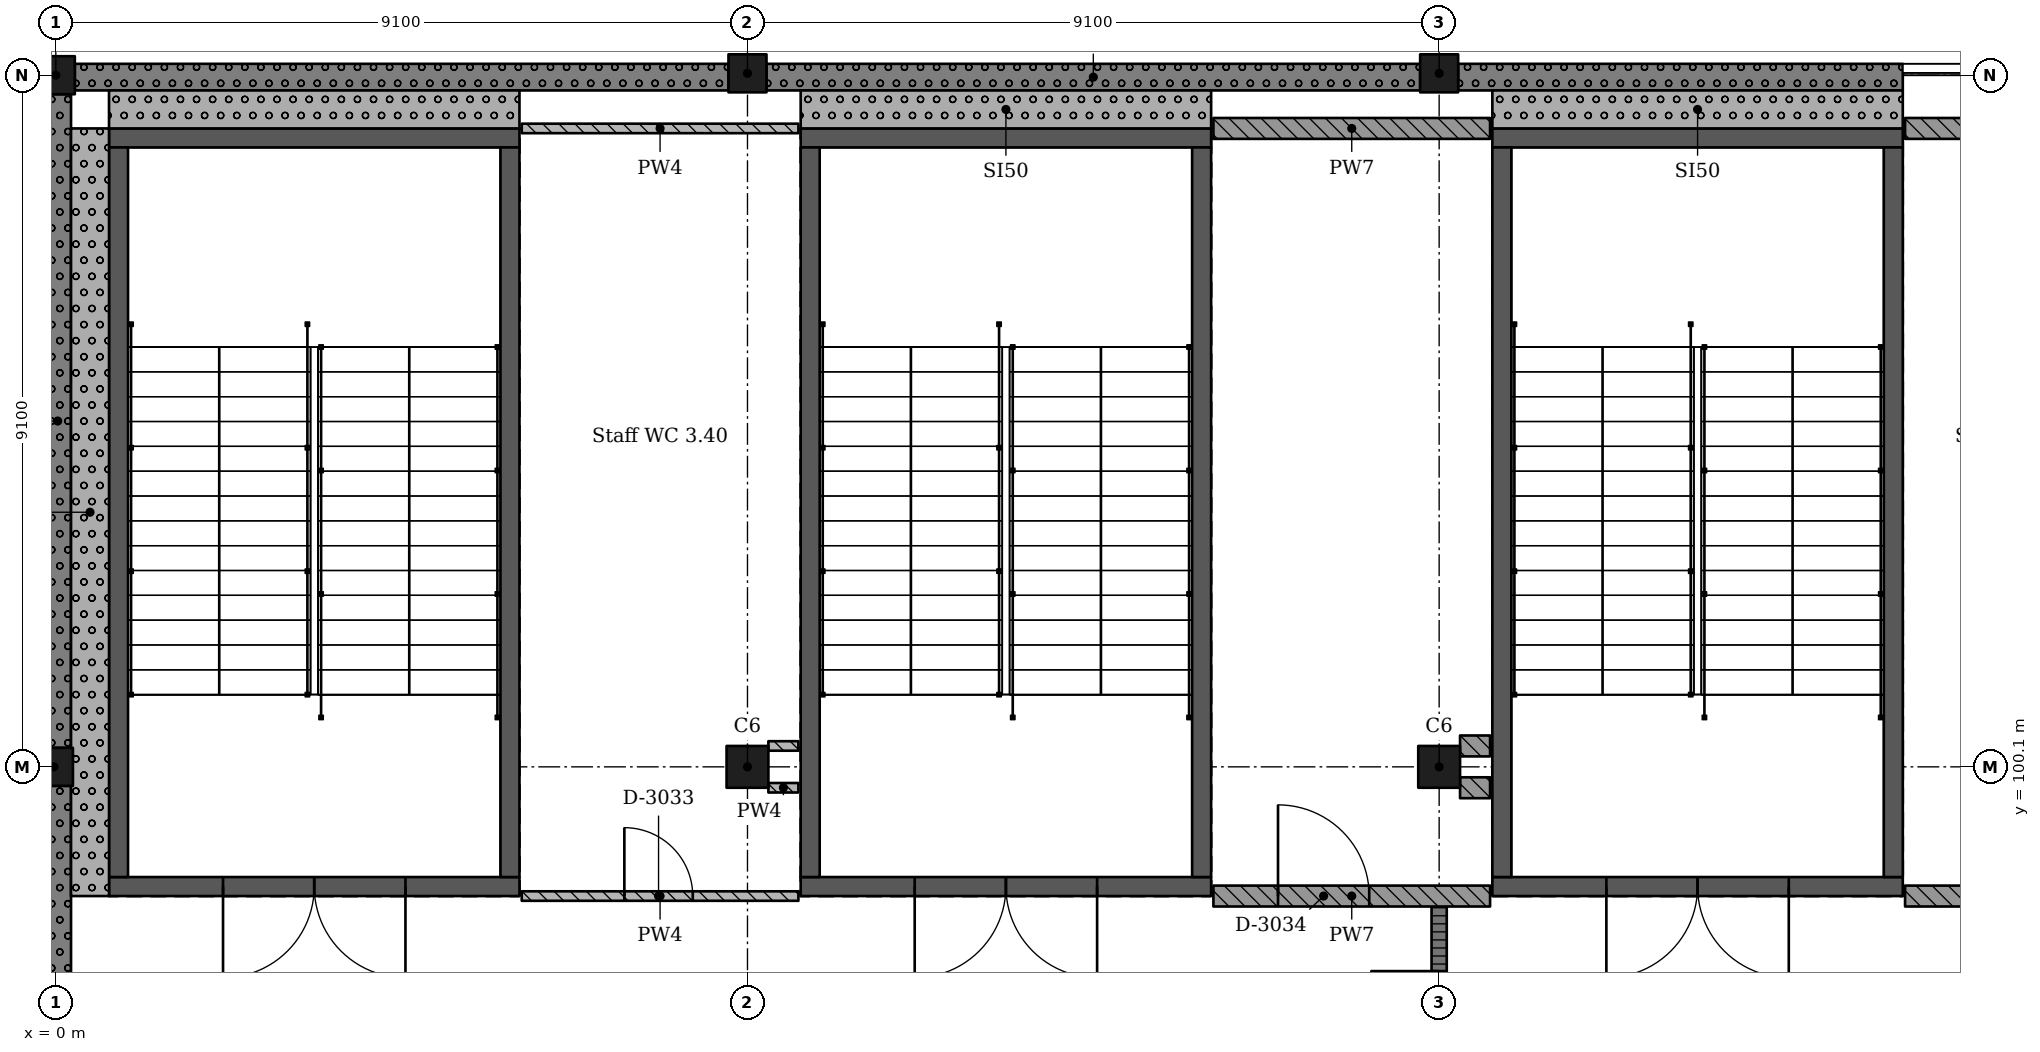
"""IFC4 building model, lengths in metres.
Left out: names, types, materials, properties, quantities, classifications, styles, units other than length and angle.
Written with IfcOpenShell. Run it as: python <this file> out.ifc"""

import sys

from ifc_helpers import new_model, si_unit, direction, frame, frame_2d, origin, origin_2d, place, context, subcontext, project, spatial, rectangle, extrude, element, fill, save


model = new_model("IFC4")
c1 = context("Model", 3, precision=1e-05, world=origin(), true_north=direction((0.0, 1.0)))
c2 = subcontext(c1, "Body", "Model", "MODEL_VIEW")
j1 = project(units=[si_unit("LENGTHUNIT", "METRE"), si_unit("PLANEANGLEUNIT", "RADIAN")], contexts=[c1])
p1 = place(None, origin())
s1 = spatial("IfcSite", under=j1, at=p1, CompositionType="ELEMENT")
p2 = place(p1, origin())
s2 = spatial("IfcBuilding", under=s1, at=p2, CompositionType="ELEMENT")
p3 = place(p2, frame((0.0, 0.0, 15.47)))
s3 = spatial("IfcBuildingStorey", under=s2, at=p3, CompositionType="ELEMENT", Elevation=15.47)
for number, where, z_axis, x_axis in (
    (1, (-0.025, 100.1, 0.0), (0.0, 0.0, 1.0), (1.0, 0.0, 0.0)),
    (2, (0.0, 109.2, 0.0), (0.0, 0.0, 1.0), (1.0, 0.0, 0.0)),
):
    element("IfcColumn", number, at=place(p3, frame(where, z_axis=z_axis, x_axis=x_axis)), inside=s3, PredefinedType="COLUMN", context=c2, shape_type="SweptSolid", body=[
        extrude(rectangle(XDim=0.5, YDim=0.5, at=origin_2d()), origin(), (0.0, 0.0, 1.0), 4.55),
    ])
p4 = place(p3, frame((9.1, 100.1, 0.0), z_axis=(0.0, 0.0, 1.0), x_axis=(1.0, 0.0, 0.0)))
e3 = element("IfcColumn", 3, at=p4, inside=s3, PredefinedType="COLUMN", context=c2, shape_type="SweptSolid", body=[
    extrude(rectangle(XDim=0.55, YDim=0.55, at=origin_2d()), origin(), (0.0, 0.0, 1.0), 4.55),
])
p5 = place(p3, frame((9.1, 109.225, 0.0), z_axis=(0.0, 0.0, 1.0), x_axis=(1.0, 0.0, 0.0)))
e4 = element("IfcColumn", 4, at=p5, inside=s3, PredefinedType="COLUMN", context=c2, shape_type="SweptSolid", body=[
    extrude(rectangle(XDim=0.5, YDim=0.5, at=origin_2d()), origin(), (0.0, 0.0, 1.0), 4.55),
])
p6 = place(p3, frame((18.2, 100.1, 0.0), z_axis=(0.0, 0.0, 1.0), x_axis=(1.0, 0.0, 0.0)))
e5 = element("IfcColumn", 5, at=p6, inside=s3, PredefinedType="COLUMN", context=c2, shape_type="SweptSolid", body=[
    extrude(rectangle(XDim=0.55, YDim=0.55, at=origin_2d()), origin(), (0.0, 0.0, 1.0), 4.55),
])
p7 = place(p3, frame((18.2, 109.225, 0.0), z_axis=(0.0, 0.0, 1.0), x_axis=(1.0, 0.0, 0.0)))
e6 = element("IfcColumn", 6, at=p7, inside=s3, PredefinedType="COLUMN", context=c2, shape_type="SweptSolid", body=[
    extrude(rectangle(XDim=0.5, YDim=0.5, at=origin_2d()), origin(), (0.0, 0.0, 1.0), 4.55),
])
p8 = place(p3, frame((6.1, 98.525, 0.0), z_axis=(0.0, 0.0, 1.0), x_axis=(-1.0, 0.0, 0.0)))
e7 = element("IfcWall", 7, at=p8, inside=s3, PredefinedType="SHEAR", context=c2, shape_type="SweptSolid", body=[
    extrude(rectangle(XDim=5.4, YDim=0.25, at=frame_2d((2.7, 0.0))), origin(), (0.0, 0.0, 1.0), 4.55),
])
p9 = place(p8, frame((1.5, 0.0, 0.0)))
e8 = element("IfcOpeningElement", 8, at=p9, cuts=e7, PredefinedType="OPENING", context=c2, shape_type="SweptSolid", body=[
    extrude(rectangle(XDim=2.4, YDim=2.1, at=frame_2d((1.2, 1.05))), frame((0.0, 0.135, 0.0), z_axis=(0.0, -1.0, 0.0), x_axis=(1.0, 0.0, 0.0)), (0.0, 0.0, 1.0), 0.27),
])
p10 = place(p3, frame((6.1, 108.375, 0.0), z_axis=(0.0, 0.0, 1.0), x_axis=(-1.0, 0.0, 0.0)))
e9 = element("IfcWall", 9, at=p10, inside=s3, PredefinedType="SHEAR", context=c2, shape_type="SweptSolid", body=[
    extrude(rectangle(XDim=5.4, YDim=0.25, at=frame_2d((2.7, 0.0))), origin(), (0.0, 0.0, 1.0), 4.55),
])
for number, where, z_axis, x_axis in (
    (10, (0.825, 108.25, 0.0), (0.0, 0.0, 1.0), (0.0, -1.0, 0.0)),
    (11, (5.975, 108.25, 0.0), (0.0, 0.0, 1.0), (0.0, -1.0, 0.0)),
):
    element("IfcWall", number, at=place(p3, frame(where, z_axis=z_axis, x_axis=x_axis)), inside=s3, PredefinedType="SHEAR", context=c2, shape_type="SweptSolid", body=[
        extrude(rectangle(XDim=9.6, YDim=0.25, at=frame_2d((4.8, 0.0))), origin(), (0.0, 0.0, 1.0), 4.55),
    ])
p11 = place(p3, frame((15.2, 98.525, 0.0), z_axis=(0.0, 0.0, 1.0), x_axis=(-1.0, 0.0, 0.0)))
e12 = element("IfcWall", 12, at=p11, inside=s3, PredefinedType="SHEAR", context=c2, shape_type="SweptSolid", body=[
    extrude(rectangle(XDim=5.4, YDim=0.25, at=frame_2d((2.7, 0.0))), origin(), (0.0, 0.0, 1.0), 4.55),
])
p12 = place(p11, frame((1.5, 0.0, 0.0)))
e13 = element("IfcOpeningElement", 13, at=p12, cuts=e12, PredefinedType="OPENING", context=c2, shape_type="SweptSolid", body=[
    extrude(rectangle(XDim=2.4, YDim=2.1, at=frame_2d((1.2, 1.05))), frame((0.0, 0.135, 0.0), z_axis=(0.0, -1.0, 0.0), x_axis=(1.0, 0.0, 0.0)), (0.0, 0.0, 1.0), 0.27),
])
p13 = place(p3, frame((15.2, 108.375, 0.0), z_axis=(0.0, 0.0, 1.0), x_axis=(-1.0, 0.0, 0.0)))
e14 = element("IfcWall", 14, at=p13, inside=s3, PredefinedType="SHEAR", context=c2, shape_type="SweptSolid", body=[
    extrude(rectangle(XDim=5.4, YDim=0.25, at=frame_2d((2.7, 0.0))), origin(), (0.0, 0.0, 1.0), 4.55),
])
for number, where, z_axis, x_axis in (
    (15, (9.925, 108.25, 0.0), (0.0, 0.0, 1.0), (0.0, -1.0, 0.0)),
    (16, (15.075, 108.25, 0.0), (0.0, 0.0, 1.0), (0.0, -1.0, 0.0)),
):
    element("IfcWall", number, at=place(p3, frame(where, z_axis=z_axis, x_axis=x_axis)), inside=s3, PredefinedType="SHEAR", context=c2, shape_type="SweptSolid", body=[
        extrude(rectangle(XDim=9.6, YDim=0.25, at=frame_2d((4.8, 0.0))), origin(), (0.0, 0.0, 1.0), 4.55),
    ])
p14 = place(p3, frame((24.3, 98.525, 0.0), z_axis=(0.0, 0.0, 1.0), x_axis=(-1.0, 0.0, 0.0)))
e17 = element("IfcWall", 17, at=p14, inside=s3, PredefinedType="SHEAR", context=c2, shape_type="SweptSolid", body=[
    extrude(rectangle(XDim=5.4, YDim=0.25, at=frame_2d((2.7, 0.0))), origin(), (0.0, 0.0, 1.0), 4.55),
])
p15 = place(p14, frame((1.5, 0.0, 0.0)))
e18 = element("IfcOpeningElement", 18, at=p15, cuts=e17, PredefinedType="OPENING", context=c2, shape_type="SweptSolid", body=[
    extrude(rectangle(XDim=2.4, YDim=2.1, at=frame_2d((1.2, 1.05))), frame((0.0, 0.135, 0.0), z_axis=(0.0, -1.0, 0.0), x_axis=(1.0, 0.0, 0.0)), (0.0, 0.0, 1.0), 0.27),
])
p16 = place(p3, frame((24.3, 108.375, 0.0), z_axis=(0.0, 0.0, 1.0), x_axis=(-1.0, 0.0, 0.0)))
e19 = element("IfcWall", 19, at=p16, inside=s3, PredefinedType="SHEAR", context=c2, shape_type="SweptSolid", body=[
    extrude(rectangle(XDim=5.4, YDim=0.25, at=frame_2d((2.7, 0.0))), origin(), (0.0, 0.0, 1.0), 4.55),
])
for number, where, z_axis, x_axis in (
    (20, (19.025, 108.25, 0.0), (0.0, 0.0, 1.0), (0.0, -1.0, 0.0)),
    (21, (24.175, 108.25, 0.0), (0.0, 0.0, 1.0), (0.0, -1.0, 0.0)),
):
    element("IfcWall", number, at=place(p3, frame(where, z_axis=z_axis, x_axis=x_axis)), inside=s3, PredefinedType="SHEAR", context=c2, shape_type="SweptSolid", body=[
        extrude(rectangle(XDim=9.6, YDim=0.25, at=frame_2d((4.8, 0.0))), origin(), (0.0, 0.0, 1.0), 4.55),
    ])
p17 = place(p3, frame((24.3, 109.175, 0.0), z_axis=(0.0, 0.0, 1.0), x_axis=(-1.0, 0.0, 0.0)))
e22 = element("IfcWall", 22, at=p17, inside=s3, PredefinedType="SOLIDWALL", context=c2, shape_type="SweptSolid", body=[
    extrude(rectangle(XDim=5.85, YDim=0.35, at=frame_2d((2.925, 0.0))), origin(), (0.0, 0.0, 1.0), 3.55),
])
p18 = place(p3, frame((17.95, 109.175, 0.0), z_axis=(0.0, 0.0, 1.0), x_axis=(-1.0, 0.0, 0.0)))
e23 = element("IfcWall", 23, at=p18, inside=s3, PredefinedType="SOLIDWALL", context=c2, shape_type="SweptSolid", body=[
    extrude(rectangle(XDim=8.6, YDim=0.35, at=frame_2d((4.3, 0.0))), origin(), (0.0, 0.0, 1.0), 3.55),
])
p19 = place(p3, frame((8.85, 109.175, 0.0), z_axis=(0.0, 0.0, 1.0), x_axis=(-1.0, 0.0, 0.0)))
e24 = element("IfcWall", 24, at=p19, inside=s3, PredefinedType="SOLIDWALL", context=c2, shape_type="SweptSolid", body=[
    extrude(rectangle(XDim=8.6, YDim=0.35, at=frame_2d((4.3, 0.0))), origin(), (0.0, 0.0, 1.0), 3.55),
])
p20 = place(p3, frame((0.025, 108.95, 0.0), z_axis=(0.0, 0.0, 1.0), x_axis=(0.0, -1.0, 0.0)))
e25 = element("IfcWall", 25, at=p20, inside=s3, PredefinedType="SOLIDWALL", context=c2, shape_type="SweptSolid", body=[
    extrude(rectangle(XDim=8.6, YDim=0.35, at=frame_2d((4.3, 0.0))), origin(), (0.0, 0.0, 1.0), 3.55),
])
p21 = place(p3, frame((0.025, 99.85, 0.0), z_axis=(0.0, 0.0, 1.0), x_axis=(0.0, -1.0, 0.0)))
e26 = element("IfcWall", 26, at=p21, inside=s3, PredefinedType="SOLIDWALL", context=c2, shape_type="SweptSolid", body=[
    extrude(rectangle(XDim=8.575, YDim=0.35, at=frame_2d((4.288, 0.0))), origin(), (0.0, 0.0, 1.0), 3.55),
])
p22 = place(p3, frame((0.7, 108.75, 0.0), z_axis=(0.0, 0.0, 1.0), x_axis=(1.0, 0.0, 0.0)))
e27 = element("IfcWall", 27, at=p22, inside=s3, PredefinedType="SOLIDWALL", context=c2, shape_type="SweptSolid", body=[
    extrude(rectangle(XDim=5.4, YDim=0.5, at=frame_2d((2.7, 0.0))), origin(), (0.0, 0.0, 1.0), 4.3),
])
p23 = place(p3, frame((0.45, 98.4, 0.0), z_axis=(0.0, 0.0, 1.0), x_axis=(0.0, 1.0, 0.0)))
e28 = element("IfcWall", 28, at=p23, inside=s3, PredefinedType="SOLIDWALL", context=c2, shape_type="SweptSolid", body=[
    extrude(rectangle(XDim=10.1, YDim=0.5, at=frame_2d((5.05, 0.0))), origin(), (0.0, 0.0, 1.0), 4.3),
])
p24 = place(p3, frame((9.8, 108.75, 0.0), z_axis=(0.0, 0.0, 1.0), x_axis=(1.0, 0.0, 0.0)))
e29 = element("IfcWall", 29, at=p24, inside=s3, PredefinedType="SOLIDWALL", context=c2, shape_type="SweptSolid", body=[
    extrude(rectangle(XDim=5.4, YDim=0.5, at=frame_2d((2.7, 0.0))), origin(), (0.0, 0.0, 1.0), 4.3),
])
p25 = place(p3, frame((18.9, 108.75, 0.0), z_axis=(0.0, 0.0, 1.0), x_axis=(1.0, 0.0, 0.0)))
e30 = element("IfcWall", 30, at=p25, inside=s3, PredefinedType="SOLIDWALL", context=c2, shape_type="SweptSolid", body=[
    extrude(rectangle(XDim=5.4, YDim=0.5, at=frame_2d((2.7, 0.0))), origin(), (0.0, 0.0, 1.0), 4.3),
])
p26 = place(p3, frame((6.13, 98.4, 0.0), z_axis=(0.0, 0.0, 1.0), x_axis=(1.0, 0.0, 0.0)))
e31 = element("IfcWall", 31, at=p26, inside=s3, PredefinedType="PARTITIONING", context=c2, shape_type="SweptSolid", body=[
    extrude(rectangle(XDim=3.64, YDim=0.125, at=frame_2d((1.82, 0.0))), origin(), (0.0, 0.0, 1.0), 4.3),
])
p27 = place(p26, frame((1.35, 0.0, 0.0)))
e32 = element("IfcOpeningElement", 32, at=p27, cuts=e31, PredefinedType="OPENING", context=c2, shape_type="SweptSolid", body=[
    extrude(rectangle(XDim=0.9, YDim=2.1, at=frame_2d((0.45, 1.05))), frame((0.0, 0.073, 0.0), z_axis=(0.0, -1.0, 0.0), x_axis=(1.0, 0.0, 0.0)), (0.0, 0.0, 1.0), 0.145),
])
p28 = place(p3, frame((6.13, 108.5, 0.0), z_axis=(0.0, 0.0, 1.0), x_axis=(1.0, 0.0, 0.0)))
e33 = element("IfcWall", 33, at=p28, inside=s3, PredefinedType="PARTITIONING", context=c2, shape_type="SweptSolid", body=[
    extrude(rectangle(XDim=3.64, YDim=0.125, at=frame_2d((1.82, 0.0))), origin(), (0.0, 0.0, 1.0), 4.3),
])
for number, where, z_axis, x_axis in (
    (34, (9.375, 99.825, 0.0), (0.0, 0.0, 1.0), (1.0, 0.0, 0.0)),
    (35, (9.77, 100.375, 0.0), (0.0, 0.0, 1.0), (-1.0, 0.0, 0.0)),
):
    element("IfcWall", number, at=place(p3, frame(where, z_axis=z_axis, x_axis=x_axis)), inside=s3, PredefinedType="PARTITIONING", context=c2, shape_type="SweptSolid", body=[
        extrude(rectangle(XDim=0.395, YDim=0.125, at=frame_2d((0.198, 0.0))), origin(), (0.0, 0.0, 1.0), 4.3),
    ])
p29 = place(p3, frame((15.23, 98.4, 0.0), z_axis=(0.0, 0.0, 1.0), x_axis=(1.0, 0.0, 0.0)))
e36 = element("IfcWall", 36, at=p29, inside=s3, PredefinedType="SOLIDWALL", context=c2, shape_type="SweptSolid", body=[
    extrude(rectangle(XDim=3.64, YDim=0.275, at=frame_2d((1.82, 0.0))), origin(), (0.0, 0.0, 1.0), 4.3),
])
p30 = place(p29, frame((0.85, 0.0, 0.0)))
e37 = element("IfcOpeningElement", 37, at=p30, cuts=e36, PredefinedType="OPENING", context=c2, shape_type="SweptSolid", body=[
    extrude(rectangle(XDim=1.2, YDim=2.4, at=frame_2d((0.6, 1.2))), frame((0.0, 0.147, 0.0), z_axis=(0.0, -1.0, 0.0), x_axis=(1.0, 0.0, 0.0)), (0.0, 0.0, 1.0), 0.295),
])
p31 = place(p3, frame((15.23, 108.5, 0.0), z_axis=(0.0, 0.0, 1.0), x_axis=(1.0, 0.0, 0.0)))
e38 = element("IfcWall", 38, at=p31, inside=s3, PredefinedType="SOLIDWALL", context=c2, shape_type="SweptSolid", body=[
    extrude(rectangle(XDim=3.64, YDim=0.275, at=frame_2d((1.82, 0.0))), origin(), (0.0, 0.0, 1.0), 4.3),
])
p32 = place(p3, frame((18.2, 98.262, 0.0), z_axis=(0.0, 0.0, 1.0), x_axis=(0.0, -1.0, 0.0)))
e39 = element("IfcWall", 39, at=p32, inside=s3, PredefinedType="PARTITIONING", context=c2, shape_type="SweptSolid", body=[
    extrude(rectangle(XDim=6.912, YDim=0.2, at=frame_2d((3.456, 0.0))), origin(), (0.0, 0.0, 1.0), 3.55),
])
p33 = place(p32, frame((0.85, 0.0, 0.0)))
e40 = element("IfcOpeningElement", 40, at=p33, cuts=e39, PredefinedType="OPENING", context=c2, shape_type="SweptSolid", body=[
    extrude(rectangle(XDim=1.8, YDim=2.4, at=frame_2d((0.9, 1.2))), frame((0.0, 0.11, 0.0), z_axis=(0.0, -1.0, 0.0), x_axis=(1.0, 0.0, 0.0)), (0.0, 0.0, 1.0), 0.22),
])
p34 = place(p32, frame((4.25, 0.0, 0.0)))
e41 = element("IfcOpeningElement", 41, at=p34, cuts=e39, PredefinedType="OPENING", context=c2, shape_type="SweptSolid", body=[
    extrude(rectangle(XDim=1.8, YDim=2.4, at=frame_2d((0.9, 1.2))), frame((0.0, 0.11, 0.0), z_axis=(0.0, -1.0, 0.0), x_axis=(1.0, 0.0, 0.0)), (0.0, 0.0, 1.0), 0.22),
])
for number, where, z_axis, x_axis in (
    (42, (18.475, 99.825, 0.0), (0.0, 0.0, 1.0), (1.0, 0.0, 0.0)),
    (43, (18.87, 100.375, 0.0), (0.0, 0.0, 1.0), (-1.0, 0.0, 0.0)),
):
    element("IfcWall", number, at=place(p3, frame(where, z_axis=z_axis, x_axis=x_axis)), inside=s3, PredefinedType="SOLIDWALL", context=c2, shape_type="SweptSolid", body=[
        extrude(rectangle(XDim=0.395, YDim=0.275, at=frame_2d((0.198, 0.0))), origin(), (0.0, 0.0, 1.0), 4.3),
    ])
p35 = place(p3, frame((24.33, 98.4, 0.0), z_axis=(0.0, 0.0, 1.0), x_axis=(1.0, 0.0, 0.0)))
e44 = element("IfcWall", 44, at=p35, inside=s3, PredefinedType="SOLIDWALL", context=c2, shape_type="SweptSolid", body=[
    extrude(rectangle(XDim=3.64, YDim=0.275, at=frame_2d((1.82, 0.0))), origin(), (0.0, 0.0, 1.0), 4.3),
])
p36 = place(p35, frame((1.25, 0.0, 0.0)))
e45 = element("IfcOpeningElement", 45, at=p36, cuts=e44, PredefinedType="OPENING", context=c2, shape_type="SweptSolid", body=[
    extrude(rectangle(XDim=1.2, YDim=2.4, at=frame_2d((0.6, 1.2))), frame((0.0, 0.147, 0.0), z_axis=(0.0, -1.0, 0.0), x_axis=(1.0, 0.0, 0.0)), (0.0, 0.0, 1.0), 0.295),
])
p37 = place(p3, frame((24.33, 108.5, 0.0), z_axis=(0.0, 0.0, 1.0), x_axis=(1.0, 0.0, 0.0)))
e46 = element("IfcWall", 46, at=p37, inside=s3, PredefinedType="SOLIDWALL", context=c2, shape_type="SweptSolid", body=[
    extrude(rectangle(XDim=3.64, YDim=0.275, at=frame_2d((1.82, 0.0))), origin(), (0.0, 0.0, 1.0), 4.3),
])
p38 = place(p27, origin())
e47 = element("IfcDoor", 47, at=p38, inside=s3, OperationType="SINGLE_SWING_RIGHT", PredefinedType="DOOR", context=c2, shape_type="SweptSolid", body=[
    extrude(rectangle(XDim=0.9, YDim=2.1, at=frame_2d((0.45, 1.05))), frame((0.0, 0.025, 0.0), z_axis=(0.0, -1.0, 0.0), x_axis=(1.0, 0.0, 0.0)), (0.0, 0.0, 1.0), 0.05),
])
fill(e32, e47)
p39 = place(p30, origin())
e48 = element("IfcDoor", 48, at=p39, inside=s3, OperationType="SINGLE_SWING_RIGHT", PredefinedType="DOOR", context=c2, shape_type="SweptSolid", body=[
    extrude(rectangle(XDim=1.2, YDim=2.4, at=frame_2d((0.6, 1.2))), frame((0.0, 0.025, 0.0), z_axis=(0.0, -1.0, 0.0), x_axis=(1.0, 0.0, 0.0)), (0.0, 0.0, 1.0), 0.05),
])
fill(e37, e48)
p40 = place(p33, origin())
e49 = element("IfcDoor", 49, at=p40, inside=s3, OperationType="DOUBLE_DOOR_SINGLE_SWING", PredefinedType="DOOR", context=c2, shape_type="SweptSolid", body=[
    extrude(rectangle(XDim=1.8, YDim=2.4, at=frame_2d((0.9, 1.2))), frame((0.0, 0.025, 0.0), z_axis=(0.0, -1.0, 0.0), x_axis=(1.0, 0.0, 0.0)), (0.0, 0.0, 1.0), 0.05),
])
fill(e40, e49)
p41 = place(p9, origin())
e50 = element("IfcDoor", 50, at=p41, inside=s3, OperationType="DOUBLE_DOOR_SINGLE_SWING", PredefinedType="DOOR", context=c2, shape_type="SweptSolid", body=[
    extrude(rectangle(XDim=2.4, YDim=2.1, at=frame_2d((1.2, 1.05))), frame((0.0, 0.025, 0.0), z_axis=(0.0, -1.0, 0.0), x_axis=(1.0, 0.0, 0.0)), (0.0, 0.0, 1.0), 0.05),
])
fill(e8, e50)
p42 = place(p12, origin())
e51 = element("IfcDoor", 51, at=p42, inside=s3, OperationType="DOUBLE_DOOR_SINGLE_SWING", PredefinedType="DOOR", context=c2, shape_type="SweptSolid", body=[
    extrude(rectangle(XDim=2.4, YDim=2.1, at=frame_2d((1.2, 1.05))), frame((0.0, 0.025, 0.0), z_axis=(0.0, -1.0, 0.0), x_axis=(1.0, 0.0, 0.0)), (0.0, 0.0, 1.0), 0.05),
])
fill(e13, e51)
p43 = place(p15, origin())
e52 = element("IfcDoor", 52, at=p43, inside=s3, OperationType="DOUBLE_DOOR_SINGLE_SWING", PredefinedType="DOOR", context=c2, shape_type="SweptSolid", body=[
    extrude(rectangle(XDim=2.4, YDim=2.1, at=frame_2d((1.2, 1.05))), frame((0.0, 0.025, 0.0), z_axis=(0.0, -1.0, 0.0), x_axis=(1.0, 0.0, 0.0)), (0.0, 0.0, 1.0), 0.05),
])
fill(e18, e52)
save(model, sys.argv[1])
